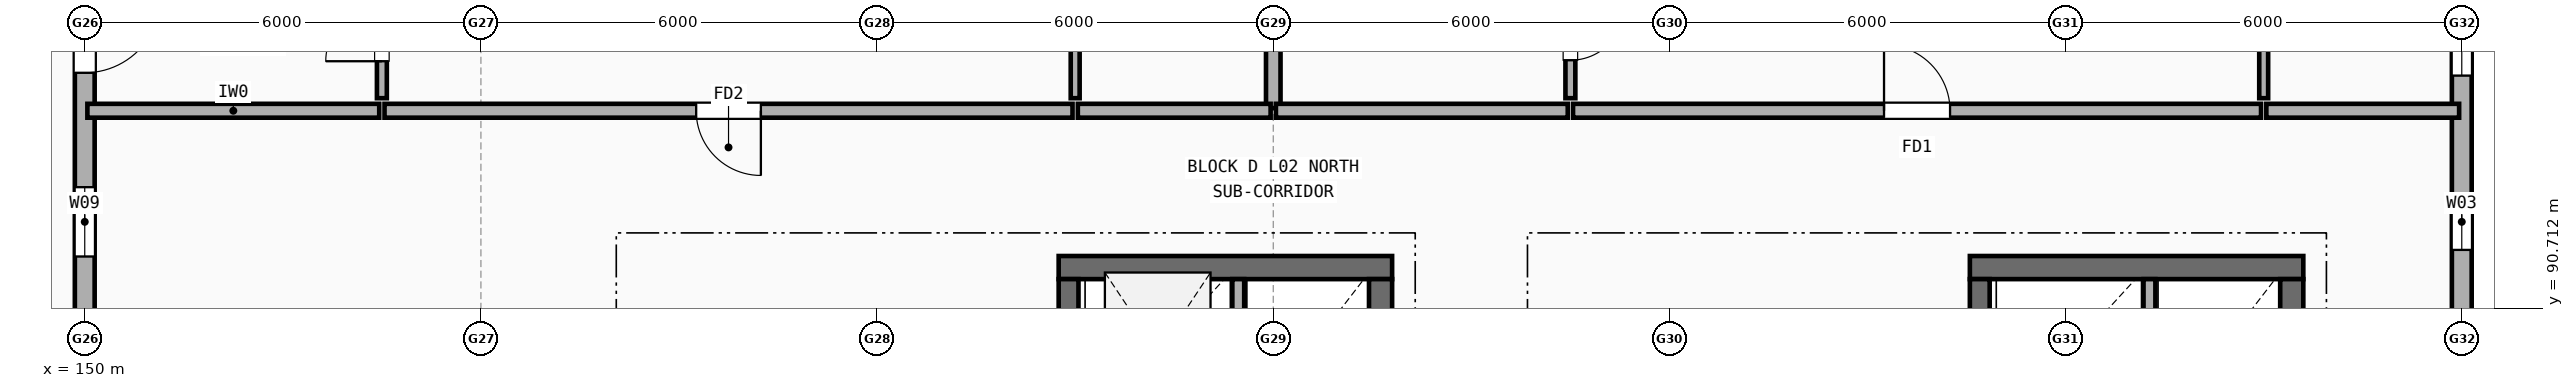
"""IFC4 building model, lengths in metres.
Left out: names, types, materials, properties, quantities, classifications, styles, units other than length and angle.
Written with IfcOpenShell. Run it as: python <this file> out.ifc"""

import sys

from ifc_helpers import new_model, si_unit, direction, frame, frame_2d, origin, place, context, subcontext, project, spatial, rectangle, extrude, element, fill, save


model = new_model("IFC4")
c1 = context("Model", 3, precision=1e-05, world=origin(), true_north=direction((0.0, 1.0)))
c2 = subcontext(c1, "Body", "Model", "MODEL_VIEW")
j1 = project(units=[si_unit("LENGTHUNIT", "METRE"), si_unit("PLANEANGLEUNIT", "RADIAN")], contexts=[c1])
p1 = place(None, origin())
s1 = spatial("IfcSite", under=j1, at=p1, CompositionType="ELEMENT")
p2 = place(p1, origin())
s2 = spatial("IfcBuilding", under=s1, at=p2, CompositionType="ELEMENT")
p3 = place(p2, frame((0.0, 0.0, 7.7)))
s3 = spatial("IfcBuildingStorey", under=s2, at=p3, CompositionType="ELEMENT", Elevation=7.7)
p4 = place(p3, frame((186.0, 90.375, 0.0), z_axis=(0.0, 0.0, 1.0), x_axis=(0.0, 1.0, 0.0)))
e1 = element("IfcWall", 1, at=p4, inside=s3, PredefinedType="STANDARD", context=c2, shape_type="SweptSolid", body=[
    extrude(rectangle(XDim=5.25, YDim=0.3, at=frame_2d((2.625, 0.0))), origin(), (0.0, 0.0, 1.0), 2.437),
])
p5 = place(p4, frame((1.218, 0.0, 0.9)))
e2 = element("IfcOpeningElement", 2, at=p5, cuts=e1, PredefinedType="OPENING", context=c2, shape_type="SweptSolid", body=[
    extrude(rectangle(XDim=0.85, YDim=1.25, at=frame_2d((0.425, 0.625))), frame((0.0, 0.16, 0.0), z_axis=(0.0, -1.0, 0.0), x_axis=(1.0, 0.0, 0.0)), (0.0, 0.0, 1.0), 0.32),
])
p6 = place(p4, frame((3.857, 0.0, 0.9)))
e3 = element("IfcOpeningElement", 3, at=p6, cuts=e1, PredefinedType="OPENING", context=c2, shape_type="SweptSolid", body=[
    extrude(rectangle(XDim=0.9, YDim=1.3, at=frame_2d((0.45, 0.65))), frame((0.0, 0.16, 0.0), z_axis=(0.0, -1.0, 0.0), x_axis=(1.0, 0.0, 0.0)), (0.0, 0.0, 1.0), 0.32),
])
p7 = place(p3, frame((150.0, 95.625, 0.0), z_axis=(0.0, 0.0, 1.0), x_axis=(0.0, -1.0, 0.0)))
e4 = element("IfcWall", 4, at=p7, inside=s3, PredefinedType="STANDARD", context=c2, shape_type="SweptSolid", body=[
    extrude(rectangle(XDim=5.25, YDim=0.3, at=frame_2d((2.625, 0.0))), origin(), (0.0, 0.0, 1.0), 2.437),
])
p8 = place(p7, frame((0.2, 0.0, 0.0)))
e5 = element("IfcOpeningElement", 5, at=p8, cuts=e4, PredefinedType="OPENING", context=c2, shape_type="SweptSolid", body=[
    extrude(rectangle(XDim=1.15, YDim=2.15, at=frame_2d((0.575, 1.075))), frame((0.0, 0.16, 0.0), z_axis=(0.0, -1.0, 0.0), x_axis=(1.0, 0.0, 0.0)), (0.0, 0.0, 1.0), 0.32),
])
p9 = place(p7, frame((3.083, 0.0, 0.9)))
e6 = element("IfcOpeningElement", 6, at=p9, cuts=e4, PredefinedType="OPENING", context=c2, shape_type="SweptSolid", body=[
    extrude(rectangle(XDim=1.05, YDim=1.35, at=frame_2d((0.525, 0.675))), frame((0.0, 0.16, 0.0), z_axis=(0.0, -1.0, 0.0), x_axis=(1.0, 0.0, 0.0)), (0.0, 0.0, 1.0), 0.32),
])
p10 = place(p3, frame((169.8, 91.325, 0.0), z_axis=(0.0, 0.0, 1.0), x_axis=(-1.0, 0.0, 0.0)))
e7 = element("IfcWall", 7, at=p10, inside=s3, PredefinedType="SHEAR", context=c2, shape_type="SweptSolid", body=[
    extrude(rectangle(XDim=5.05, YDim=0.35, at=frame_2d((2.525, 0.0))), origin(), (0.0, 0.0, 1.0), 2.955),
])
p11 = place(p3, frame((169.625, 84.75, 0.0), z_axis=(0.0, 0.0, 1.0), x_axis=(0.0, 1.0, 0.0)))
e8 = element("IfcWall", 8, at=p11, inside=s3, PredefinedType="SHEAR", context=c2, shape_type="SweptSolid", body=[
    extrude(rectangle(XDim=6.4, YDim=0.35, at=frame_2d((3.2, 0.0))), origin(), (0.0, 0.0, 1.0), 2.955),
])
p12 = place(p3, frame((164.9, 87.8, 0.0), z_axis=(0.0, 0.0, 1.0), x_axis=(0.0, 1.0, 0.0)))
e9 = element("IfcWall", 9, at=p12, inside=s3, PredefinedType="SHEAR", context=c2, shape_type="SweptSolid", body=[
    extrude(rectangle(XDim=3.35, YDim=0.3, at=frame_2d((1.675, 0.0))), origin(), (0.0, 0.0, 1.0), 2.955),
])
p13 = place(p3, frame((167.47, 88.94, 0.0), z_axis=(0.0, 0.0, 1.0), x_axis=(0.0, 1.0, 0.0)))
e10 = element("IfcWall", 10, at=p13, inside=s3, PredefinedType="SOLIDWALL", context=c2, shape_type="SweptSolid", body=[
    extrude(rectangle(XDim=2.21, YDim=0.18, at=frame_2d((1.105, 0.0))), origin(), (0.0, 0.0, 1.0), 2.955),
])
p14 = place(p3, frame((183.6, 91.325, 0.0), z_axis=(0.0, 0.0, 1.0), x_axis=(-1.0, 0.0, 0.0)))
e11 = element("IfcWall", 11, at=p14, inside=s3, PredefinedType="SHEAR", context=c2, shape_type="SweptSolid", body=[
    extrude(rectangle(XDim=5.05, YDim=0.35, at=frame_2d((2.525, 0.0))), origin(), (0.0, 0.0, 1.0), 2.955),
])
p15 = place(p3, frame((183.425, 84.75, 0.0), z_axis=(0.0, 0.0, 1.0), x_axis=(0.0, 1.0, 0.0)))
e12 = element("IfcWall", 12, at=p15, inside=s3, PredefinedType="SHEAR", context=c2, shape_type="SweptSolid", body=[
    extrude(rectangle(XDim=6.4, YDim=0.35, at=frame_2d((3.2, 0.0))), origin(), (0.0, 0.0, 1.0), 2.955),
])
p16 = place(p3, frame((178.7, 87.7, 0.0), z_axis=(0.0, 0.0, 1.0), x_axis=(0.0, 1.0, 0.0)))
e13 = element("IfcWall", 13, at=p16, inside=s3, PredefinedType="SHEAR", context=c2, shape_type="SweptSolid", body=[
    extrude(rectangle(XDim=3.45, YDim=0.3, at=frame_2d((1.725, 0.0))), origin(), (0.0, 0.0, 1.0), 2.955),
])
p17 = place(p3, frame((181.27, 88.94, 0.0), z_axis=(0.0, 0.0, 1.0), x_axis=(0.0, 1.0, 0.0)))
e14 = element("IfcWall", 14, at=p17, inside=s3, PredefinedType="SOLIDWALL", context=c2, shape_type="SweptSolid", body=[
    extrude(rectangle(XDim=2.21, YDim=0.18, at=frame_2d((1.105, 0.0))), origin(), (0.0, 0.0, 1.0), 2.955),
])
p18 = place(p3, frame((168.0, 93.74, 0.0), z_axis=(0.0, 0.0, 1.0), x_axis=(0.0, 1.0, 0.0)))
e15 = element("IfcWall", 15, at=p18, inside=s3, PredefinedType="SOLIDWALL", context=c2, shape_type="SweptSolid", body=[
    extrude(rectangle(XDim=13.87, YDim=0.22, at=frame_2d((6.935, 0.0))), origin(), (0.0, 0.0, 1.0), 2.337),
])
p19 = place(p3, frame((150.04, 93.7, 0.0), z_axis=(0.0, 0.0, 1.0), x_axis=(1.0, 0.0, 0.0)))
e16 = element("IfcWall", 16, at=p19, inside=s3, PredefinedType="SOLIDWALL", context=c2, shape_type="SweptSolid", body=[
    extrude(rectangle(XDim=4.42, YDim=0.21, at=frame_2d((2.21, 0.0))), origin(), (0.0, 0.0, 1.0), 2.437),
])
p20 = place(p3, frame((154.54, 93.7, 0.0), z_axis=(0.0, 0.0, 1.0), x_axis=(1.0, 0.0, 0.0)))
e17 = element("IfcWall", 17, at=p20, inside=s3, PredefinedType="SOLIDWALL", context=c2, shape_type="SweptSolid", body=[
    extrude(rectangle(XDim=10.42, YDim=0.21, at=frame_2d((5.21, 0.0))), origin(), (0.0, 0.0, 1.0), 2.437),
])
p21 = place(p20, frame((4.72, 0.0, 0.0)))
e18 = element("IfcOpeningElement", 18, at=p21, cuts=e17, PredefinedType="OPENING", context=c2, shape_type="SweptSolid", body=[
    extrude(rectangle(XDim=0.98, YDim=2.15, at=frame_2d((0.49, 1.075))), frame((0.0, 0.115, 0.0), z_axis=(0.0, -1.0, 0.0), x_axis=(1.0, 0.0, 0.0)), (0.0, 0.0, 1.0), 0.23),
])
p22 = place(p3, frame((154.5, 93.89, 0.0), z_axis=(0.0, 0.0, 1.0), x_axis=(0.0, 1.0, 0.0)))
e19 = element("IfcWall", 19, at=p22, inside=s3, PredefinedType="PARTITIONING", context=c2, shape_type="SweptSolid", body=[
    extrude(rectangle(XDim=1.97, YDim=0.15, at=frame_2d((0.985, 0.0))), origin(), (0.0, 0.0, 1.0), 2.955),
])
p23 = place(p22, frame((0.56, 0.0, 0.0)))
e20 = element("IfcOpeningElement", 20, at=p23, cuts=e19, PredefinedType="OPENING", context=c2, shape_type="SweptSolid", body=[
    extrude(rectangle(XDim=0.85, YDim=2.1, at=frame_2d((0.425, 1.05))), frame((0.0, 0.085, 0.0), z_axis=(0.0, -1.0, 0.0), x_axis=(1.0, 0.0, 0.0)), (0.0, 0.0, 1.0), 0.17),
])
p24 = place(p3, frame((165.04, 93.7, 0.0), z_axis=(0.0, 0.0, 1.0), x_axis=(1.0, 0.0, 0.0)))
e21 = element("IfcWall", 21, at=p24, inside=s3, PredefinedType="SOLIDWALL", context=c2, shape_type="SweptSolid", body=[
    extrude(rectangle(XDim=2.92, YDim=0.21, at=frame_2d((1.46, 0.0))), origin(), (0.0, 0.0, 1.0), 2.508),
])
p25 = place(p3, frame((165.0, 93.89, 0.0), z_axis=(0.0, 0.0, 1.0), x_axis=(0.0, 1.0, 0.0)))
e22 = element("IfcWall", 22, at=p25, inside=s3, PredefinedType="PARTITIONING", context=c2, shape_type="SweptSolid", body=[
    extrude(rectangle(XDim=13.92, YDim=0.135, at=frame_2d((6.96, 0.0))), origin(), (0.0, 0.0, 1.0), 2.387),
])
p26 = place(p25, frame((6.65, 0.0, 0.0)))
e23 = element("IfcOpeningElement", 23, at=p26, cuts=e22, PredefinedType="OPENING", context=c2, shape_type="SweptSolid", body=[
    extrude(rectangle(XDim=0.9, YDim=2.1, at=frame_2d((0.45, 1.05))), frame((0.0, 0.077, 0.0), z_axis=(0.0, -1.0, 0.0), x_axis=(1.0, 0.0, 0.0)), (0.0, 0.0, 1.0), 0.155),
])
p27 = place(p3, frame((168.04, 93.7, 0.0), z_axis=(0.0, 0.0, 1.0), x_axis=(1.0, 0.0, 0.0)))
e24 = element("IfcWall", 24, at=p27, inside=s3, PredefinedType="SOLIDWALL", context=c2, shape_type="SweptSolid", body=[
    extrude(rectangle(XDim=4.42, YDim=0.21, at=frame_2d((2.21, 0.0))), origin(), (0.0, 0.0, 1.0), 2.508),
])
p28 = place(p3, frame((172.54, 93.7, 0.0), z_axis=(0.0, 0.0, 1.0), x_axis=(1.0, 0.0, 0.0)))
e25 = element("IfcWall", 25, at=p28, inside=s3, PredefinedType="SOLIDWALL", context=c2, shape_type="SweptSolid", body=[
    extrude(rectangle(XDim=10.42, YDim=0.21, at=frame_2d((5.21, 0.0))), origin(), (0.0, 0.0, 1.0), 2.955),
])
p29 = place(p28, frame((4.71, 0.0, 0.0)))
e26 = element("IfcOpeningElement", 26, at=p29, cuts=e25, PredefinedType="OPENING", context=c2, shape_type="SweptSolid", body=[
    extrude(rectangle(XDim=1.0, YDim=2.15, at=frame_2d((0.5, 1.075))), frame((0.0, 0.115, 0.0), z_axis=(0.0, -1.0, 0.0), x_axis=(1.0, 0.0, 0.0)), (0.0, 0.0, 1.0), 0.23),
])
p30 = place(p3, frame((172.5, 93.89, 0.0), z_axis=(0.0, 0.0, 1.0), x_axis=(0.0, 1.0, 0.0)))
e27 = element("IfcWall", 27, at=p30, inside=s3, PredefinedType="PARTITIONING", context=c2, shape_type="SweptSolid", body=[
    extrude(rectangle(XDim=1.97, YDim=0.15, at=frame_2d((0.985, 0.0))), origin(), (0.0, 0.0, 1.0), 2.955),
])
p31 = place(p30, frame((0.575, 0.0, 0.0)))
e28 = element("IfcOpeningElement", 28, at=p31, cuts=e27, PredefinedType="OPENING", context=c2, shape_type="SweptSolid", body=[
    extrude(rectangle(XDim=0.82, YDim=2.08, at=frame_2d((0.41, 1.04))), frame((0.0, 0.085, 0.0), z_axis=(0.0, -1.0, 0.0), x_axis=(1.0, 0.0, 0.0)), (0.0, 0.0, 1.0), 0.17),
])
p32 = place(p3, frame((183.04, 93.7, 0.0), z_axis=(0.0, 0.0, 1.0), x_axis=(1.0, 0.0, 0.0)))
e29 = element("IfcWall", 29, at=p32, inside=s3, PredefinedType="SOLIDWALL", context=c2, shape_type="SweptSolid", body=[
    extrude(rectangle(XDim=2.92, YDim=0.21, at=frame_2d((1.46, 0.0))), origin(), (0.0, 0.0, 1.0), 2.437),
])
p33 = place(p3, frame((183.0, 93.89, 0.0), z_axis=(0.0, 0.0, 1.0), x_axis=(0.0, 1.0, 0.0)))
e30 = element("IfcWall", 30, at=p33, inside=s3, PredefinedType="PARTITIONING", context=c2, shape_type="SweptSolid", body=[
    extrude(rectangle(XDim=13.92, YDim=0.135, at=frame_2d((6.96, 0.0))), origin(), (0.0, 0.0, 1.0), 2.387),
])
p34 = place(p33, frame((6.65, 0.0, 0.0)))
e31 = element("IfcOpeningElement", 31, at=p34, cuts=e30, PredefinedType="OPENING", context=c2, shape_type="SweptSolid", body=[
    extrude(rectangle(XDim=0.88, YDim=2.1, at=frame_2d((0.44, 1.05))), frame((0.0, 0.077, 0.0), z_axis=(0.0, -1.0, 0.0), x_axis=(1.0, 0.0, 0.0)), (0.0, 0.0, 1.0), 0.155),
])
p35 = place(p5, origin())
e32 = element("IfcWindow", 32, at=p35, inside=s3, PartitioningType="SINGLE_PANEL", PredefinedType="WINDOW", context=c2, shape_type="SweptSolid", body=[
    extrude(rectangle(XDim=0.85, YDim=1.25, at=frame_2d((0.425, 0.625))), frame((0.0, 0.03, 0.0), z_axis=(0.0, -1.0, 0.0), x_axis=(1.0, 0.0, 0.0)), (0.0, 0.0, 1.0), 0.06),
])
fill(e2, e32)
p36 = place(p6, origin())
e33 = element("IfcWindow", 33, at=p36, inside=s3, PartitioningType="SINGLE_PANEL", PredefinedType="WINDOW", context=c2, shape_type="SweptSolid", body=[
    extrude(rectangle(XDim=0.9, YDim=1.3, at=frame_2d((0.45, 0.65))), frame((0.0, 0.03, 0.0), z_axis=(0.0, -1.0, 0.0), x_axis=(1.0, 0.0, 0.0)), (0.0, 0.0, 1.0), 0.06),
])
fill(e3, e33)
p37 = place(p8, frame((1.15, 0.0, 0.0), z_axis=(0.0, 0.0, 1.0), x_axis=(-1.0, 0.0, 0.0)))
e34 = element("IfcDoor", 34, at=p37, inside=s3, OperationType="SINGLE_SWING_LEFT", PredefinedType="DOOR", context=c2, shape_type="SweptSolid", body=[
    extrude(rectangle(XDim=1.15, YDim=2.15, at=frame_2d((0.575, 1.075))), frame((0.0, 0.025, 0.0), z_axis=(0.0, -1.0, 0.0), x_axis=(1.0, 0.0, 0.0)), (0.0, 0.0, 1.0), 0.05),
])
fill(e5, e34)
p38 = place(p9, origin())
e35 = element("IfcWindow", 35, at=p38, inside=s3, PartitioningType="SINGLE_PANEL", PredefinedType="WINDOW", context=c2, shape_type="SweptSolid", body=[
    extrude(rectangle(XDim=1.05, YDim=1.35, at=frame_2d((0.525, 0.675))), frame((0.0, 0.03, 0.0), z_axis=(0.0, -1.0, 0.0), x_axis=(1.0, 0.0, 0.0)), (0.0, 0.0, 1.0), 0.06),
])
fill(e6, e35)
p39 = place(p21, origin())
e36 = element("IfcDoor", 36, at=p39, inside=s3, OperationType="SINGLE_SWING_RIGHT", PredefinedType="DOOR", context=c2, shape_type="SweptSolid", body=[
    extrude(rectangle(XDim=0.98, YDim=2.15, at=frame_2d((0.49, 1.075))), frame((0.0, 0.025, 0.0), z_axis=(0.0, -1.0, 0.0), x_axis=(1.0, 0.0, 0.0)), (0.0, 0.0, 1.0), 0.05),
])
fill(e18, e36)
p40 = place(p23, origin())
e37 = element("IfcDoor", 37, at=p40, inside=s3, OperationType="SINGLE_SWING_LEFT", PredefinedType="DOOR", context=c2, shape_type="SweptSolid", body=[
    extrude(rectangle(XDim=0.85, YDim=2.1, at=frame_2d((0.425, 1.05))), frame((0.0, 0.025, 0.0), z_axis=(0.0, -1.0, 0.0), x_axis=(1.0, 0.0, 0.0)), (0.0, 0.0, 1.0), 0.05),
])
fill(e20, e37)
p41 = place(p29, origin())
e38 = element("IfcDoor", 38, at=p41, inside=s3, OperationType="SINGLE_SWING_LEFT", PredefinedType="DOOR", context=c2, shape_type="SweptSolid", body=[
    extrude(rectangle(XDim=1.0, YDim=2.15, at=frame_2d((0.5, 1.075))), frame((0.0, 0.025, 0.0), z_axis=(0.0, -1.0, 0.0), x_axis=(1.0, 0.0, 0.0)), (0.0, 0.0, 1.0), 0.05),
])
fill(e26, e38)
p42 = place(p31, origin())
e39 = element("IfcDoor", 39, at=p42, inside=s3, OperationType="SINGLE_SWING_RIGHT", PredefinedType="DOOR", context=c2, shape_type="SweptSolid", body=[
    extrude(rectangle(XDim=0.82, YDim=2.08, at=frame_2d((0.41, 1.04))), frame((0.0, 0.025, 0.0), z_axis=(0.0, -1.0, 0.0), x_axis=(1.0, 0.0, 0.0)), (0.0, 0.0, 1.0), 0.05),
])
fill(e28, e39)
save(model, sys.argv[1])
